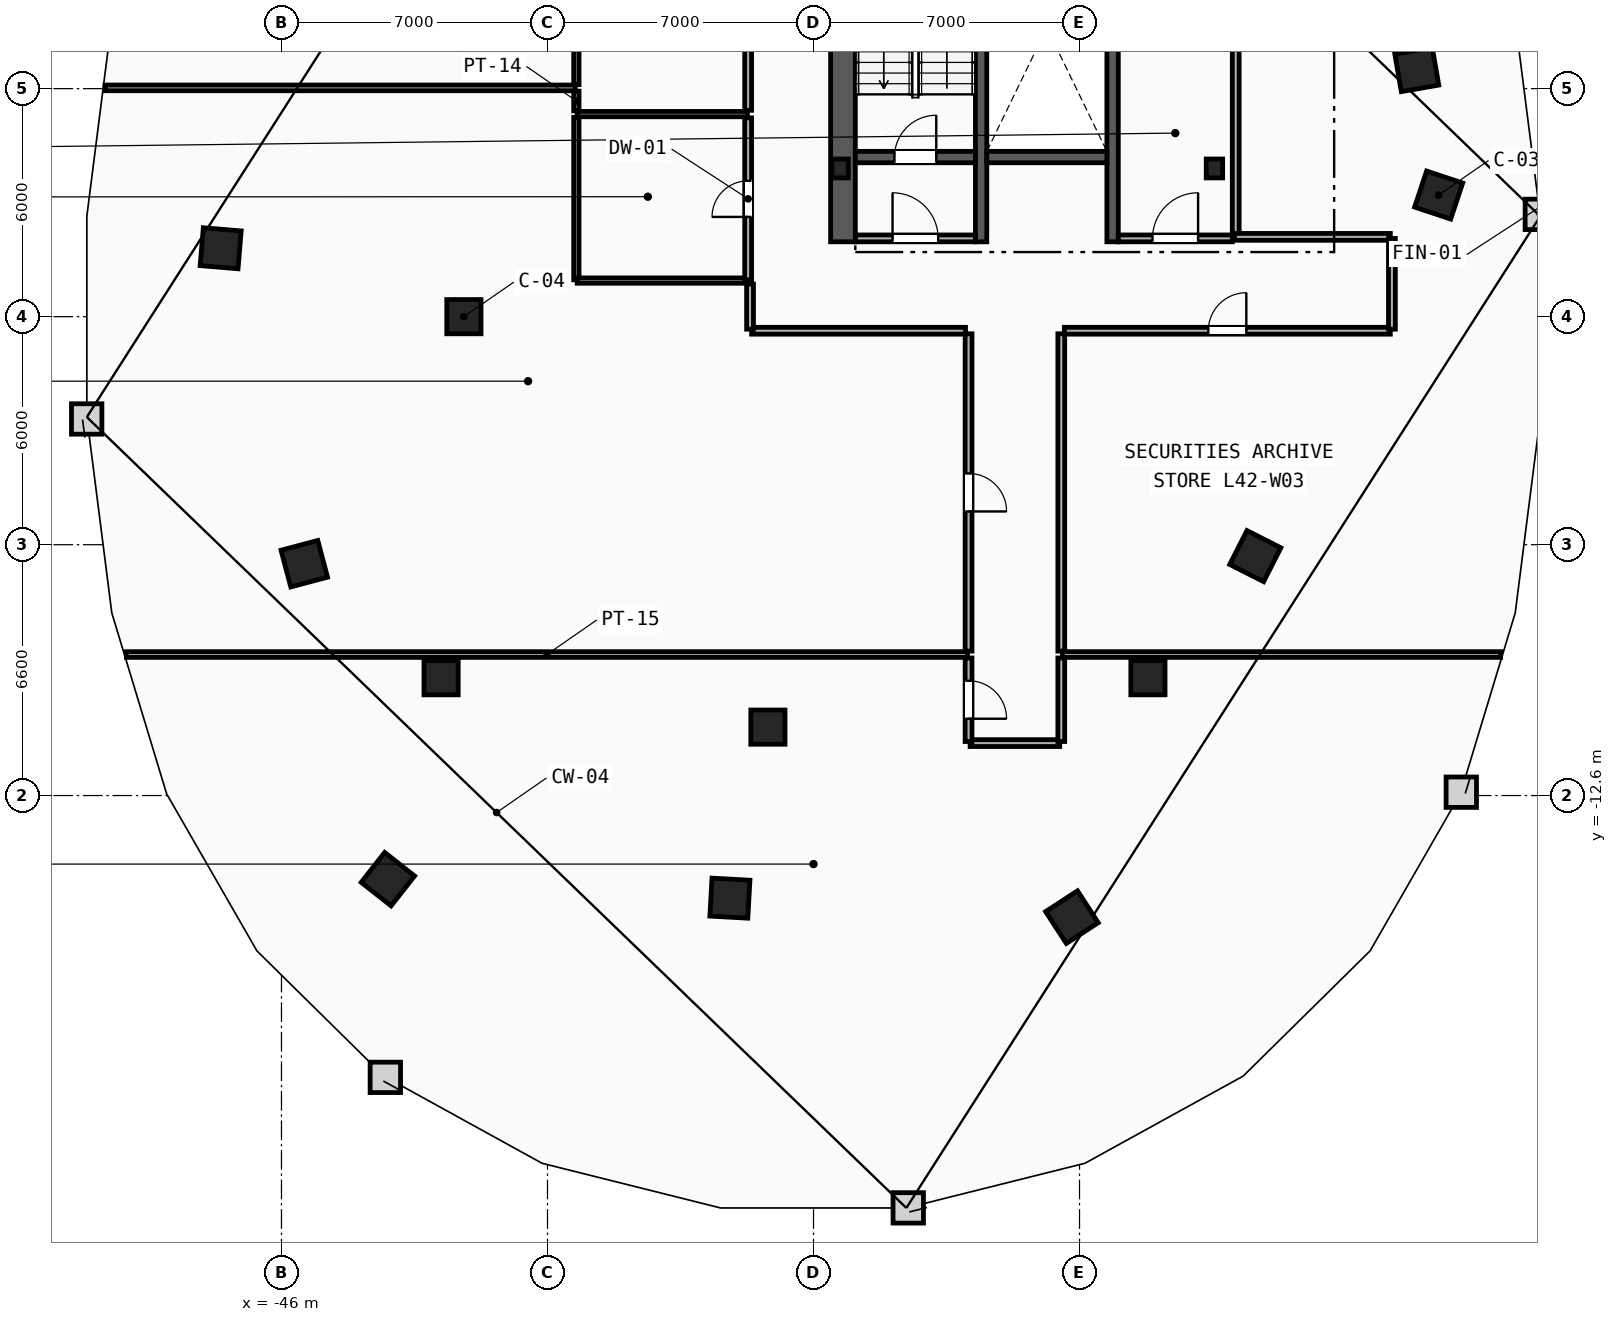
"""IFC4 building model, lengths in metres.
Left out: names, types, materials, properties, quantities, classifications, styles, units other than length and angle.
Written with IfcOpenShell. Run it as: python <this file> out.ifc"""

import sys

from ifc_helpers import new_model, si_unit, direction, frame, frame_2d, origin, origin_2d, place, context, subcontext, project, spatial, rectangle, i_section, extrude, element, fill, save


model = new_model("IFC4")
c1 = context("Model", 3, precision=1e-05, world=origin(), true_north=direction((0.0, 1.0)))
c2 = subcontext(c1, "Body", "Model", "MODEL_VIEW")
j1 = project(units=[si_unit("LENGTHUNIT", "METRE"), si_unit("PLANEANGLEUNIT", "RADIAN")], contexts=[c1])
p1 = place(None, origin())
s1 = spatial("IfcSite", under=j1, at=p1, CompositionType="ELEMENT")
p2 = place(p1, origin())
s2 = spatial("IfcBuilding", under=s1, at=p2, CompositionType="ELEMENT")
p3 = place(p2, frame((0.0, 0.0, 162.0)))
s3 = spatial("IfcBuildingStorey", under=s2, at=p3, CompositionType="ELEMENT", Elevation=162.0)
for number, where, z_axis, x_axis in (
    (1, (-31.3, 3.9, 0.0), (0.0, 0.0, 1.0), (1.0, 0.0, 0.0)),
    (2, (-21.45, 3.9, 0.0), (0.0, 0.0, 1.0), (1.0, 0.0, 0.0)),
):
    element("IfcColumn", number, at=place(p3, frame(where, z_axis=z_axis, x_axis=x_axis)), inside=s3, PredefinedType="COLUMN", context=c2, shape_type="SweptSolid", body=[
        extrude(i_section(OverallWidth=0.432, OverallDepth=0.498, WebThickness=0.056, FlangeThickness=0.089, FilletRadius=0.018, at=origin_2d()), origin(), (0.0, 0.0, 1.0), 3.6),
    ])
for number, where, z_axis, x_axis in (
    (3, (-41.2, 0.0, 0.0), (0.0, 0.0, 1.0), (1.0, 0.0, 0.0)),
    (4, (-41.8, -9.5, 0.0), (0.0, 0.0, 1.0), (1.0, 0.0, 0.0)),
    (5, (-33.2, -10.8, 0.0), (0.0, 0.0, 1.0), (1.0, 0.0, 0.0)),
    (6, (-23.2, -9.5, 0.0), (0.0, 0.0, 1.0), (1.0, 0.0, 0.0)),
):
    element("IfcColumn", number, at=place(p3, frame(where, z_axis=z_axis, x_axis=x_axis)), inside=s3, PredefinedType="COLUMN", context=c2, shape_type="SweptSolid", body=[
        extrude(rectangle(XDim=0.9, YDim=0.9, at=origin_2d()), origin(), (0.0, 0.0, 1.0), 3.6),
    ])
for number, where, z_axis, x_axis in (
    (7, (-15.55, 3.2, 0.0), (0.0, 0.0, 1.0), (0.315, 0.949, 0.0)),
    (8, (-16.125, 6.5, 0.0), (0.0, 0.0, 1.0), (-0.172, 0.985, 0.0)),
    (9, (-47.6, 1.8, 0.0), (0.0, 0.0, 1.0), (-0.084, -0.997, 0.0)),
    (10, (-45.4, -6.5, 0.0), (0.0, 0.0, 1.0), (0.256, -0.967, 0.0)),
    (11, (-43.2, -14.8, 0.0), (0.0, 0.0, 1.0), (0.786, -0.618, 0.0)),
    (12, (-34.2, -15.3, 0.0), (0.0, 0.0, 1.0), (0.998, -0.055, 0.0)),
    (13, (-25.2, -15.8, 0.0), (0.0, 0.0, 1.0), (0.838, 0.546, 0.0)),
    (14, (-20.375, -6.3, 0.0), (0.0, 0.0, 1.0), (0.453, 0.892, 0.0)),
):
    element("IfcColumn", number, at=place(p3, frame(where, z_axis=z_axis, x_axis=x_axis)), inside=s3, PredefinedType="COLUMN", context=c2, shape_type="SweptSolid", body=[
        extrude(rectangle(XDim=1.0, YDim=1.0, at=origin_2d()), origin(), (0.0, 0.0, 1.0), 3.6),
    ])
p4 = place(p3, frame((-31.225, 1.97, 0.0), z_axis=(0.0, 0.0, 1.0), x_axis=(0.0, 1.0, 0.0)))
e15 = element("IfcWall", 15, at=p4, inside=s3, PredefinedType="SHEAR", context=c2, shape_type="SweptSolid", body=[
    extrude(rectangle(XDim=13.33, YDim=0.65, at=frame_2d((6.665, 0.0))), origin(), (0.0, 0.0, 1.0), 3.36),
])
for number, where, z_axis, x_axis in (
    (16, (-27.59, 1.97, 0.0), (0.0, 0.0, 1.0), (0.0, 1.0, 0.0)),
    (17, (-24.13, 1.97, 0.0), (0.0, 0.0, 1.0), (0.0, 1.0, 0.0)),
):
    element("IfcWall", number, at=place(p3, frame(where, z_axis=z_axis, x_axis=x_axis)), inside=s3, PredefinedType="SHEAR", context=c2, shape_type="SweptSolid", body=[
        extrude(rectangle(XDim=10.68, YDim=0.3, at=frame_2d((5.34, 0.0))), origin(), (0.0, 0.0, 1.0), 3.36),
    ])
p5 = place(p3, frame((-30.9, 4.2, 0.0), z_axis=(0.0, 0.0, 1.0), x_axis=(1.0, 0.0, 0.0)))
e18 = element("IfcWall", 18, at=p5, inside=s3, PredefinedType="SHEAR", context=c2, shape_type="SweptSolid", body=[
    extrude(rectangle(XDim=3.16, YDim=0.3, at=frame_2d((1.58, 0.0))), origin(), (0.0, 0.0, 1.0), 3.36),
])
p6 = place(p5, frame((1.03, 0.0, 0.0)))
e19 = element("IfcOpeningElement", 19, at=p6, cuts=e18, PredefinedType="OPENING", context=c2, shape_type="SweptSolid", body=[
    extrude(rectangle(XDim=1.1, YDim=2.15, at=frame_2d((0.55, 1.075))), frame((0.0, 0.16, 0.0), z_axis=(0.0, -1.0, 0.0), x_axis=(1.0, 0.0, 0.0)), (0.0, 0.0, 1.0), 0.32),
])
p7 = place(p3, frame((-27.44, 4.2, 0.0), z_axis=(0.0, 0.0, 1.0), x_axis=(1.0, 0.0, 0.0)))
e20 = element("IfcWall", 20, at=p7, inside=s3, PredefinedType="SHEAR", context=c2, shape_type="SweptSolid", body=[
    extrude(rectangle(XDim=3.16, YDim=0.3, at=frame_2d((1.58, 0.0))), origin(), (0.0, 0.0, 1.0), 3.36),
])
p8 = place(p3, frame((-20.89, 2.15, 0.0), z_axis=(0.0, 0.0, 1.0), x_axis=(0.0, 1.0, 0.0)))
e21 = element("IfcWall", 21, at=p8, inside=s3, PredefinedType="PARTITIONING", context=c2, shape_type="SweptSolid", body=[
    extrude(rectangle(XDim=5.3, YDim=0.18, at=frame_2d((2.65, 0.0))), origin(), (0.0, 0.0, 1.0), 3.36),
])
p9 = place(p3, frame((-23.98, 2.06, 0.0), z_axis=(0.0, 0.0, 1.0), x_axis=(1.0, 0.0, 0.0)))
e22 = element("IfcWall", 22, at=p9, inside=s3, PredefinedType="PARTITIONING", context=c2, shape_type="SweptSolid", body=[
    extrude(rectangle(XDim=3.0, YDim=0.18, at=frame_2d((1.5, 0.0))), origin(), (0.0, 0.0, 1.0), 3.36),
])
p10 = place(p9, frame((0.9, 0.0, 0.0)))
e23 = element("IfcOpeningElement", 23, at=p10, cuts=e22, PredefinedType="OPENING", context=c2, shape_type="SweptSolid", body=[
    extrude(rectangle(XDim=1.2, YDim=2.15, at=frame_2d((0.6, 1.075))), frame((0.0, 0.1, 0.0), z_axis=(0.0, -1.0, 0.0), x_axis=(1.0, 0.0, 0.0)), (0.0, 0.0, 1.0), 0.2),
])
p11 = place(p3, frame((-30.9, 2.06, 0.0), z_axis=(0.0, 0.0, 1.0), x_axis=(1.0, 0.0, 0.0)))
e24 = element("IfcWall", 24, at=p11, inside=s3, PredefinedType="PARTITIONING", context=c2, shape_type="SweptSolid", body=[
    extrude(rectangle(XDim=3.16, YDim=0.18, at=frame_2d((1.58, 0.0))), origin(), (0.0, 0.0, 1.0), 3.36),
])
p12 = place(p11, frame((0.98, 0.0, 0.0)))
e25 = element("IfcOpeningElement", 25, at=p12, cuts=e24, PredefinedType="OPENING", context=c2, shape_type="SweptSolid", body=[
    extrude(rectangle(XDim=1.2, YDim=2.15, at=frame_2d((0.6, 1.075))), frame((0.0, 0.1, 0.0), z_axis=(0.0, -1.0, 0.0), x_axis=(1.0, 0.0, 0.0)), (0.0, 0.0, 1.0), 0.2),
])
p13 = place(p3, frame((-38.24, 0.97, 0.0), z_axis=(0.0, 0.0, 1.0), x_axis=(0.0, 1.0, 0.0)))
e26 = element("IfcWall", 26, at=p13, inside=s3, PredefinedType="PARTITIONING", context=c2, shape_type="SweptSolid", body=[
    extrude(rectangle(XDim=4.275, YDim=0.14, at=frame_2d((2.138, 0.0))), origin(), (0.0, 0.0, 1.0), 3.36),
])
p14 = place(p3, frame((-38.24, 5.415, 0.0), z_axis=(0.0, 0.0, 1.0), x_axis=(0.0, 1.0, 0.0)))
e27 = element("IfcWall", 27, at=p14, inside=s3, PredefinedType="PARTITIONING", context=c2, shape_type="SweptSolid", body=[
    extrude(rectangle(XDim=0.52, YDim=0.14, at=frame_2d((0.26, 0.0))), origin(), (0.0, 0.0, 1.0), 3.36),
])
p15 = place(p3, frame((-38.24, 6.105, 0.0), z_axis=(0.0, 0.0, 1.0), x_axis=(0.0, 1.0, 0.0)))
e28 = element("IfcWall", 28, at=p15, inside=s3, PredefinedType="PARTITIONING", context=c2, shape_type="SweptSolid", body=[
    extrude(rectangle(XDim=3.485, YDim=0.14, at=frame_2d((1.743, 0.0))), origin(), (0.0, 0.0, 1.0), 3.36),
])
for number, where, z_axis, x_axis in (
    (29, (-38.22, 0.95, 0.0), (0.0, 0.0, 1.0), (1.0, 0.0, 0.0)),
    (30, (-38.22, 5.33, 0.0), (0.0, 0.0, 1.0), (1.0, 0.0, 0.0)),
):
    element("IfcWall", number, at=place(p3, frame(where, z_axis=z_axis, x_axis=x_axis)), inside=s3, PredefinedType="PARTITIONING", context=c2, shape_type="SweptSolid", body=[
        extrude(rectangle(XDim=4.48, YDim=0.14, at=frame_2d((2.24, 0.0))), origin(), (0.0, 0.0, 1.0), 3.36),
    ])
p16 = place(p3, frame((-33.72, 0.97, 0.0), z_axis=(0.0, 0.0, 1.0), x_axis=(0.0, 1.0, 0.0)))
e31 = element("IfcWall", 31, at=p16, inside=s3, PredefinedType="PARTITIONING", context=c2, shape_type="SweptSolid", body=[
    extrude(rectangle(XDim=4.26, YDim=0.18, at=frame_2d((2.13, 0.0))), origin(), (0.0, 0.0, 1.0), 3.36),
])
p17 = place(p16, frame((1.655, 0.0, 0.0)))
e32 = element("IfcOpeningElement", 32, at=p17, cuts=e31, PredefinedType="OPENING", context=c2, shape_type="SweptSolid", body=[
    extrude(rectangle(XDim=0.95, YDim=2.1, at=frame_2d((0.475, 1.05))), frame((0.0, 0.1, 0.0), z_axis=(0.0, -1.0, 0.0), x_axis=(1.0, 0.0, 0.0)), (0.0, 0.0, 1.0), 0.2),
])
p18 = place(p3, frame((-33.72, 5.43, 0.0), z_axis=(0.0, 0.0, 1.0), x_axis=(0.0, 1.0, 0.0)))
e33 = element("IfcWall", 33, at=p18, inside=s3, PredefinedType="PARTITIONING", context=c2, shape_type="SweptSolid", body=[
    extrude(rectangle(XDim=4.16, YDim=0.18, at=frame_2d((2.08, 0.0))), origin(), (0.0, 0.0, 1.0), 3.36),
])
p19 = place(p18, frame((1.58, 0.0, 0.0)))
e34 = element("IfcOpeningElement", 34, at=p19, cuts=e33, PredefinedType="OPENING", context=c2, shape_type="SweptSolid", body=[
    extrude(rectangle(XDim=1.0, YDim=2.15, at=frame_2d((0.5, 1.075))), frame((0.0, 0.1, 0.0), z_axis=(0.0, -1.0, 0.0), x_axis=(1.0, 0.0, 0.0)), (0.0, 0.0, 1.0), 0.2),
])
p20 = place(p3, frame((-50.082, -8.89, 0.0), z_axis=(0.0, 0.0, 1.0), x_axis=(1.0, 0.0, 0.0)))
e35 = element("IfcWall", 35, at=p20, inside=s3, PredefinedType="PARTITIONING", context=c2, shape_type="SweptSolid", body=[
    extrude(rectangle(XDim=22.132, YDim=0.15, at=frame_2d((11.066, 0.0))), origin(), (0.0, 0.0, 1.0), 3.36),
])
p21 = place(p3, frame((-25.45, -8.89, 0.0), z_axis=(0.0, 0.0, 1.0), x_axis=(1.0, 0.0, 0.0)))
e36 = element("IfcWall", 36, at=p21, inside=s3, PredefinedType="PARTITIONING", context=c2, shape_type="SweptSolid", body=[
    extrude(rectangle(XDim=11.532, YDim=0.15, at=frame_2d((5.766, 0.0))), origin(), (0.0, 0.0, 1.0), 3.36),
])
p22 = place(p3, frame((-50.641, 6.02, 0.0), z_axis=(0.0, 0.0, 1.0), x_axis=(1.0, 0.0, 0.0)))
e37 = element("IfcWall", 37, at=p22, inside=s3, PredefinedType="PARTITIONING", context=c2, shape_type="SweptSolid", body=[
    extrude(rectangle(XDim=12.371, YDim=0.15, at=frame_2d((6.186, 0.0))), origin(), (0.0, 0.0, 1.0), 3.36),
])
p23 = place(p3, frame((-27.878, -11.22, 0.0), z_axis=(0.0, 0.0, 1.0), x_axis=(1.0, 0.0, 0.0)))
e38 = element("IfcWall", 38, at=p23, inside=s3, PredefinedType="PARTITIONING", context=c2, shape_type="SweptSolid", body=[
    extrude(rectangle(XDim=2.357, YDim=0.18, at=frame_2d((1.178, 0.0))), origin(), (0.0, 0.0, 1.0), 3.36),
])
p24 = place(p3, frame((-27.92, -8.98, 0.0), z_axis=(0.0, 0.0, 1.0), x_axis=(0.0, -1.0, 0.0)))
e39 = element("IfcWall", 39, at=p24, inside=s3, PredefinedType="PARTITIONING", context=c2, shape_type="SweptSolid", body=[
    extrude(rectangle(XDim=2.198, YDim=0.18, at=frame_2d((1.099, 0.0))), origin(), (0.0, 0.0, 1.0), 3.36),
])
p25 = place(p24, frame((0.599, 0.0, 0.0)))
e40 = element("IfcOpeningElement", 40, at=p25, cuts=e39, PredefinedType="OPENING", context=c2, shape_type="SweptSolid", body=[
    extrude(rectangle(XDim=1.0, YDim=2.15, at=frame_2d((0.5, 1.075))), frame((0.0, 0.1, 0.0), z_axis=(0.0, -1.0, 0.0), x_axis=(1.0, 0.0, 0.0)), (0.0, 0.0, 1.0), 0.2),
])
p26 = place(p3, frame((-25.48, -11.178, 0.0), z_axis=(0.0, 0.0, 1.0), x_axis=(0.0, 1.0, 0.0)))
e41 = element("IfcWall", 41, at=p26, inside=s3, PredefinedType="PARTITIONING", context=c2, shape_type="SweptSolid", body=[
    extrude(rectangle(XDim=2.198, YDim=0.18, at=frame_2d((1.099, 0.0))), origin(), (0.0, 0.0, 1.0), 3.36),
])
p27 = place(p3, frame((-27.92, -0.45, 0.0), z_axis=(0.0, 0.0, 1.0), x_axis=(0.0, -1.0, 0.0)))
e42 = element("IfcWall", 42, at=p27, inside=s3, PredefinedType="PARTITIONING", context=c2, shape_type="SweptSolid", body=[
    extrude(rectangle(XDim=8.35, YDim=0.18, at=frame_2d((4.175, 0.0))), origin(), (0.0, 0.0, 1.0), 3.36),
])
p28 = place(p27, frame((3.675, 0.0, 0.0)))
e43 = element("IfcOpeningElement", 43, at=p28, cuts=e42, PredefinedType="OPENING", context=c2, shape_type="SweptSolid", body=[
    extrude(rectangle(XDim=1.0, YDim=2.15, at=frame_2d((0.5, 1.075))), frame((0.0, 0.1, 0.0), z_axis=(0.0, -1.0, 0.0), x_axis=(1.0, 0.0, 0.0)), (0.0, 0.0, 1.0), 0.2),
])
p29 = place(p3, frame((-33.628, -0.37, 0.0), z_axis=(0.0, 0.0, 1.0), x_axis=(1.0, 0.0, 0.0)))
e44 = element("IfcWall", 44, at=p29, inside=s3, PredefinedType="PARTITIONING", context=c2, shape_type="SweptSolid", body=[
    extrude(rectangle(XDim=5.628, YDim=0.18, at=frame_2d((2.814, 0.0))), origin(), (0.0, 0.0, 1.0), 3.36),
])
p30 = place(p3, frame((-33.67, 0.859, 0.0), z_axis=(0.0, 0.0, 1.0), x_axis=(0.0, -1.0, 0.0)))
e45 = element("IfcWall", 45, at=p30, inside=s3, PredefinedType="PARTITIONING", context=c2, shape_type="SweptSolid", body=[
    extrude(rectangle(XDim=1.187, YDim=0.18, at=frame_2d((0.594, 0.0))), origin(), (0.0, 0.0, 1.0), 3.36),
])
p31 = place(p3, frame((-25.4, -0.37, 0.0), z_axis=(0.0, 0.0, 1.0), x_axis=(1.0, 0.0, 0.0)))
e46 = element("IfcWall", 46, at=p31, inside=s3, PredefinedType="PARTITIONING", context=c2, shape_type="SweptSolid", body=[
    extrude(rectangle(XDim=8.578, YDim=0.18, at=frame_2d((4.289, 0.0))), origin(), (0.0, 0.0, 1.0), 3.36),
])
p32 = place(p31, frame((3.789, 0.0, 0.0)))
e47 = element("IfcOpeningElement", 47, at=p32, cuts=e46, PredefinedType="OPENING", context=c2, shape_type="SweptSolid", body=[
    extrude(rectangle(XDim=1.0, YDim=2.15, at=frame_2d((0.5, 1.075))), frame((0.0, 0.1, 0.0), z_axis=(0.0, -1.0, 0.0), x_axis=(1.0, 0.0, 0.0)), (0.0, 0.0, 1.0), 0.2),
])
p33 = place(p3, frame((-25.48, -8.8, 0.0), z_axis=(0.0, 0.0, 1.0), x_axis=(0.0, 1.0, 0.0)))
e48 = element("IfcWall", 48, at=p33, inside=s3, PredefinedType="PARTITIONING", context=c2, shape_type="SweptSolid", body=[
    extrude(rectangle(XDim=8.35, YDim=0.18, at=frame_2d((4.175, 0.0))), origin(), (0.0, 0.0, 1.0), 3.36),
])
p34 = place(p3, frame((-16.822, 2.1, 0.0), z_axis=(0.0, 0.0, 1.0), x_axis=(-1.0, 0.0, 0.0)))
e49 = element("IfcWall", 49, at=p34, inside=s3, PredefinedType="PARTITIONING", context=c2, shape_type="SweptSolid", body=[
    extrude(rectangle(XDim=4.098, YDim=0.18, at=frame_2d((2.049, 0.0))), origin(), (0.0, 0.0, 1.0), 3.36),
])
p35 = place(p3, frame((-16.78, -0.329, 0.0), z_axis=(0.0, 0.0, 1.0), x_axis=(0.0, 1.0, 0.0)))
e50 = element("IfcWall", 50, at=p35, inside=s3, PredefinedType="PARTITIONING", context=c2, shape_type="SweptSolid", body=[
    extrude(rectangle(XDim=2.387, YDim=0.18, at=frame_2d((1.194, 0.0))), origin(), (0.0, 0.0, 1.0), 3.36),
])
p36 = place(p6, origin())
e51 = element("IfcDoor", 51, at=p36, inside=s3, OperationType="SINGLE_SWING_RIGHT", PredefinedType="DOOR", context=c2, shape_type="SweptSolid", body=[
    extrude(rectangle(XDim=1.1, YDim=2.15, at=frame_2d((0.55, 1.075))), frame((0.0, 0.025, 0.0), z_axis=(0.0, -1.0, 0.0), x_axis=(1.0, 0.0, 0.0)), (0.0, 0.0, 1.0), 0.05),
])
fill(e19, e51)
p37 = place(p10, origin())
e52 = element("IfcDoor", 52, at=p37, inside=s3, OperationType="SINGLE_SWING_RIGHT", PredefinedType="DOOR", context=c2, shape_type="SweptSolid", body=[
    extrude(rectangle(XDim=1.2, YDim=2.15, at=frame_2d((0.6, 1.075))), frame((0.0, 0.025, 0.0), z_axis=(0.0, -1.0, 0.0), x_axis=(1.0, 0.0, 0.0)), (0.0, 0.0, 1.0), 0.05),
])
fill(e23, e52)
p38 = place(p12, origin())
e53 = element("IfcDoor", 53, at=p38, inside=s3, OperationType="SINGLE_SWING_LEFT", PredefinedType="DOOR", context=c2, shape_type="SweptSolid", body=[
    extrude(rectangle(XDim=1.2, YDim=2.15, at=frame_2d((0.6, 1.075))), frame((0.0, 0.025, 0.0), z_axis=(0.0, -1.0, 0.0), x_axis=(1.0, 0.0, 0.0)), (0.0, 0.0, 1.0), 0.05),
])
fill(e25, e53)
p39 = place(p32, origin())
e54 = element("IfcDoor", 54, at=p39, inside=s3, OperationType="SINGLE_SWING_RIGHT", PredefinedType="DOOR", context=c2, shape_type="SweptSolid", body=[
    extrude(rectangle(XDim=1.0, YDim=2.15, at=frame_2d((0.5, 1.075))), frame((0.0, 0.025, 0.0), z_axis=(0.0, -1.0, 0.0), x_axis=(1.0, 0.0, 0.0)), (0.0, 0.0, 1.0), 0.05),
])
fill(e47, e54)
p40 = place(p28, origin())
e55 = element("IfcDoor", 55, at=p40, inside=s3, OperationType="SINGLE_SWING_RIGHT", PredefinedType="DOOR", context=c2, shape_type="SweptSolid", body=[
    extrude(rectangle(XDim=1.0, YDim=2.15, at=frame_2d((0.5, 1.075))), frame((0.0, 0.025, 0.0), z_axis=(0.0, -1.0, 0.0), x_axis=(1.0, 0.0, 0.0)), (0.0, 0.0, 1.0), 0.05),
])
fill(e43, e55)
p41 = place(p17, origin())
e56 = element("IfcDoor", 56, at=p41, inside=s3, OperationType="SINGLE_SWING_LEFT", PredefinedType="DOOR", context=c2, shape_type="SweptSolid", body=[
    extrude(rectangle(XDim=0.95, YDim=2.1, at=frame_2d((0.475, 1.05))), frame((0.0, 0.025, 0.0), z_axis=(0.0, -1.0, 0.0), x_axis=(1.0, 0.0, 0.0)), (0.0, 0.0, 1.0), 0.05),
])
fill(e32, e56)
p42 = place(p25, origin())
e57 = element("IfcDoor", 57, at=p42, inside=s3, OperationType="SINGLE_SWING_RIGHT", PredefinedType="DOOR", context=c2, shape_type="SweptSolid", body=[
    extrude(rectangle(XDim=1.0, YDim=2.15, at=frame_2d((0.5, 1.075))), frame((0.0, 0.025, 0.0), z_axis=(0.0, -1.0, 0.0), x_axis=(1.0, 0.0, 0.0)), (0.0, 0.0, 1.0), 0.05),
])
fill(e40, e57)
save(model, sys.argv[1])
